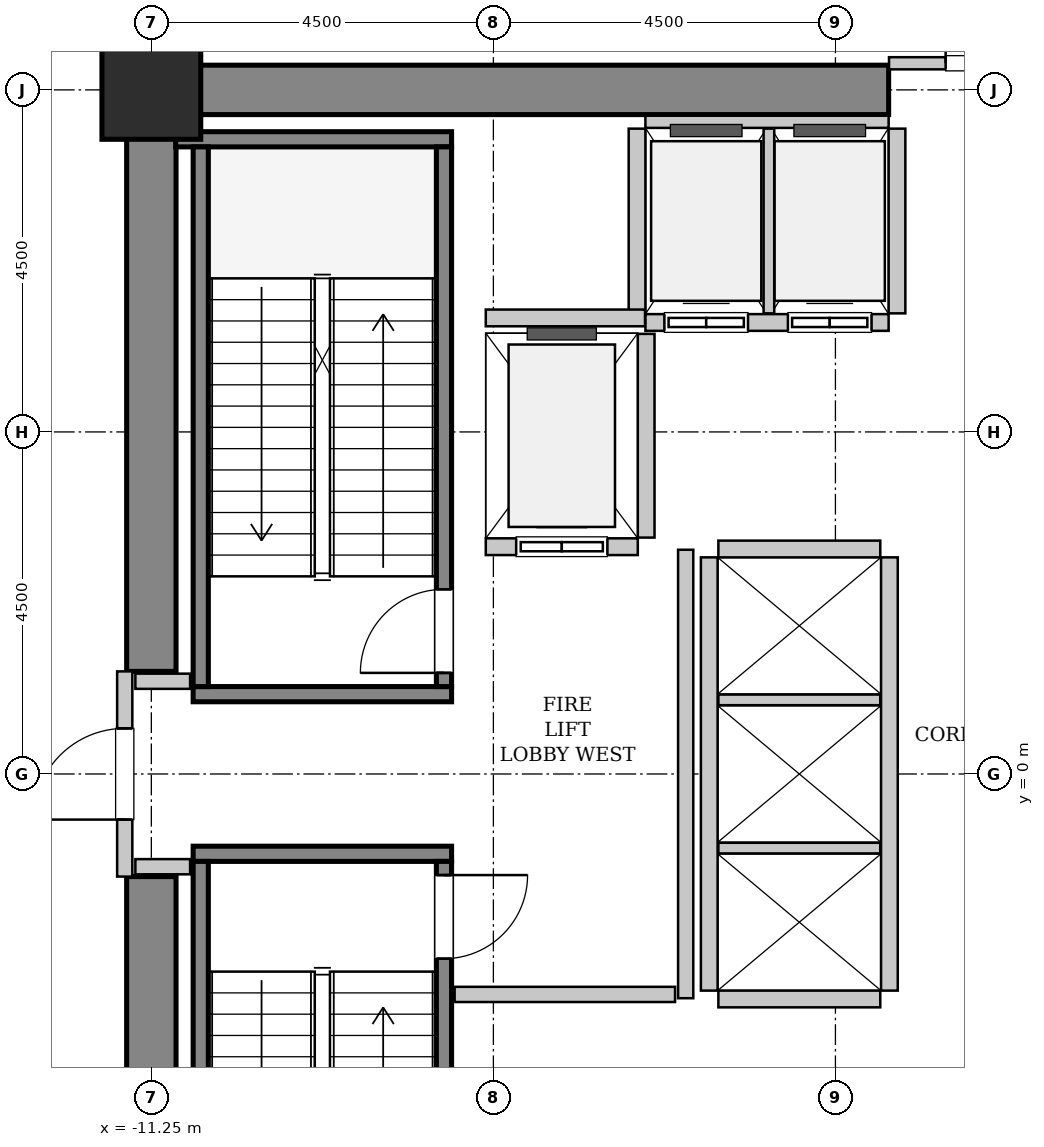
"""IFC4 building model, lengths in metres.
Left out: names, types, materials, properties, quantities, classifications, styles, units other than length and angle.
Written with IfcOpenShell. Run it as: python <this file> out.ifc"""

import sys

from ifc_helpers import new_model, si_unit, direction, frame, frame_2d, origin, origin_2d, place, context, subcontext, project, spatial, rectangle, hollow_rectangle, extrude, source, transform, mapped, element, fill, save


model = new_model("IFC4")
c1 = context("Model", 3, precision=1e-05, world=origin(), true_north=direction((0.0, 1.0)))
c2 = subcontext(c1, "Body", "Model", "MODEL_VIEW")
j1 = project(units=[si_unit("LENGTHUNIT", "METRE"), si_unit("PLANEANGLEUNIT", "RADIAN")], contexts=[c1])
p1 = place(None, origin())
s1 = spatial("IfcSite", under=j1, at=p1, CompositionType="ELEMENT")
p2 = place(p1, origin())
s2 = spatial("IfcBuilding", under=s1, at=p2, CompositionType="ELEMENT")
p3 = place(p2, frame((0.0, 0.0, 16.8)))
s3 = spatial("IfcBuildingStorey", under=s2, at=p3, CompositionType="ELEMENT", Elevation=16.8)
m1 = source(origin(), c2, "Body", "SweptSolid", [
    extrude(rectangle(XDim=10.025, YDim=0.65, at=frame_2d((5.012, 0.0))), origin(), (0.0, 0.0, 1.0), 5.4),
])
p4 = place(p3, frame((-11.575, 9.0, 0.0), z_axis=(0.0, 0.0, 1.0), x_axis=(1.0, 0.0, 0.0)))
e1 = element("IfcWall", 1, at=p4, inside=s3, PredefinedType="SHEAR", context=c2, shape_type="MappedRepresentation", body=[
    mapped(m1, transform((0.0, 0.0, 0.0), x_axis=(1.0, 0.0, 0.0), y_axis=(0.0, 1.0, 0.0), z_axis=(0.0, 0.0, 1.0), scale=1.0)),
])
m2 = source(origin(), c2, "Body", "SweptSolid", [
    extrude(rectangle(XDim=7.325, YDim=0.65, at=frame_2d((3.663, 0.0))), origin(), (0.0, 0.0, 1.0), 5.4),
])
for number, where, z_axis, x_axis in (
    (2, (-11.25, -8.675, 0.0), (0.0, 0.0, 1.0), (0.0, 1.0, 0.0)),
    (3, (-11.25, 1.35, 0.0), (0.0, 0.0, 1.0), (0.0, 1.0, 0.0)),
):
    element("IfcWall", number, at=place(p3, frame(where, z_axis=z_axis, x_axis=x_axis)), inside=s3, PredefinedType="SHEAR", context=c2, shape_type="MappedRepresentation", body=[
        mapped(m2, transform((0.0, 0.0, 0.0), x_axis=(1.0, 0.0, 0.0), y_axis=(0.0, 1.0, 0.0), z_axis=(0.0, 0.0, 1.0), scale=1.0)),
    ])
m3 = source(origin(), c2, "Body", "SweptSolid", [
    extrude(hollow_rectangle(XDim=1.3, YDim=1.3, WallThickness=0.065, InnerFilletRadius=0.065, OuterFilletRadius=0.13, at=origin_2d()), origin(), (0.0, 0.0, 1.0), 5.4),
])
p5 = place(p3, frame((-11.25, 9.0, 0.0), z_axis=(0.0, 0.0, 1.0), x_axis=(1.0, 0.0, 0.0)))
e4 = element("IfcColumn", 4, at=p5, inside=s3, PredefinedType="COLUMN", context=c2, shape_type="MappedRepresentation", body=[
    mapped(m3, transform((0.0, 0.0, 0.0), x_axis=(1.0, 0.0, 0.0), y_axis=(0.0, 1.0, 0.0), z_axis=(0.0, 0.0, 1.0), scale=1.0)),
])
m4 = source(origin(), c2, "Body", "SweptSolid", [
    extrude(rectangle(XDim=3.4, YDim=0.2, at=frame_2d((1.7, 0.0))), origin(), (0.0, 0.0, 1.0), 5.4),
])
p6 = place(p3, frame((-7.3, 1.05, 0.0), z_axis=(0.0, 0.0, 1.0), x_axis=(-1.0, 0.0, 0.0)))
e5 = element("IfcWall", 5, at=p6, inside=s3, PredefinedType="SOLIDWALL", context=c2, shape_type="MappedRepresentation", body=[
    mapped(m4, transform((0.0, 0.0, 0.0), x_axis=(1.0, 0.0, 0.0), y_axis=(0.0, 1.0, 0.0), z_axis=(0.0, 0.0, 1.0), scale=1.0)),
])
m5 = source(origin(), c2, "Body", "SweptSolid", [
    extrude(rectangle(XDim=3.63, YDim=0.2, at=frame_2d((1.815, 0.0))), origin(), (0.0, 0.0, 1.0), 5.4),
])
p7 = place(p3, frame((-7.3, 8.35, 0.0), z_axis=(0.0, 0.0, 1.0), x_axis=(-1.0, 0.0, 0.0)))
e6 = element("IfcWall", 6, at=p7, inside=s3, PredefinedType="SOLIDWALL", context=c2, shape_type="MappedRepresentation", body=[
    mapped(m5, transform((0.0, 0.0, 0.0), x_axis=(1.0, 0.0, 0.0), y_axis=(0.0, 1.0, 0.0), z_axis=(0.0, 0.0, 1.0), scale=1.0)),
])
m6 = source(origin(), c2, "Body", "SweptSolid", [
    extrude(rectangle(XDim=7.1, YDim=0.2, at=frame_2d((3.55, 0.0))), origin(), (0.0, 0.0, 1.0), 5.4),
])
p8 = place(p3, frame((-7.4, 1.15, 0.0), z_axis=(0.0, 0.0, 1.0), x_axis=(0.0, 1.0, 0.0)))
e7 = element("IfcWall", 7, at=p8, inside=s3, PredefinedType="SOLIDWALL", context=c2, shape_type="MappedRepresentation", body=[
    mapped(m6, transform((0.0, 0.0, 0.0), x_axis=(1.0, 0.0, 0.0), y_axis=(0.0, 1.0, 0.0), z_axis=(0.0, 0.0, 1.0), scale=1.0)),
])
p9 = place(p8, frame((0.18, 0.0, 0.0)))
e8 = element("IfcOpeningElement", 8, at=p9, cuts=e7, PredefinedType="OPENING", context=c2, shape_type="SweptSolid", body=[
    extrude(rectangle(XDim=1.1, YDim=2.15, at=frame_2d((0.55, 1.075))), frame((0.0, 0.11, 0.0), z_axis=(0.0, -1.0, 0.0), x_axis=(1.0, 0.0, 0.0)), (0.0, 0.0, 1.0), 0.22),
])
p10 = place(p3, frame((-10.6, 1.15, 0.0), z_axis=(0.0, 0.0, 1.0), x_axis=(0.0, 1.0, 0.0)))
e9 = element("IfcWall", 9, at=p10, inside=s3, PredefinedType="SOLIDWALL", context=c2, shape_type="MappedRepresentation", body=[
    mapped(m6, transform((0.0, 0.0, 0.0), x_axis=(1.0, 0.0, 0.0), y_axis=(0.0, 1.0, 0.0), z_axis=(0.0, 0.0, 1.0), scale=1.0)),
])
p11 = place(p3, frame((-10.7, -1.05, 0.0), z_axis=(0.0, 0.0, 1.0), x_axis=(1.0, 0.0, 0.0)))
e10 = element("IfcWall", 10, at=p11, inside=s3, PredefinedType="SOLIDWALL", context=c2, shape_type="MappedRepresentation", body=[
    mapped(m4, transform((0.0, 0.0, 0.0), x_axis=(1.0, 0.0, 0.0), y_axis=(0.0, 1.0, 0.0), z_axis=(0.0, 0.0, 1.0), scale=1.0)),
])
p12 = place(p3, frame((-10.6, -1.15, 0.0), z_axis=(0.0, 0.0, 1.0), x_axis=(0.0, -1.0, 0.0)))
e11 = element("IfcWall", 11, at=p12, inside=s3, PredefinedType="SOLIDWALL", context=c2, shape_type="MappedRepresentation", body=[
    mapped(m6, transform((0.0, 0.0, 0.0), x_axis=(1.0, 0.0, 0.0), y_axis=(0.0, 1.0, 0.0), z_axis=(0.0, 0.0, 1.0), scale=1.0)),
])
p13 = place(p3, frame((-7.4, -1.15, 0.0), z_axis=(0.0, 0.0, 1.0), x_axis=(0.0, -1.0, 0.0)))
e12 = element("IfcWall", 12, at=p13, inside=s3, PredefinedType="SOLIDWALL", context=c2, shape_type="MappedRepresentation", body=[
    mapped(m6, transform((0.0, 0.0, 0.0), x_axis=(1.0, 0.0, 0.0), y_axis=(0.0, 1.0, 0.0), z_axis=(0.0, 0.0, 1.0), scale=1.0)),
])
p14 = place(p13, frame((0.18, 0.0, 0.0)))
e13 = element("IfcOpeningElement", 13, at=p14, cuts=e12, PredefinedType="OPENING", context=c2, shape_type="SweptSolid", body=[
    extrude(rectangle(XDim=1.1, YDim=2.15, at=frame_2d((0.55, 1.075))), frame((0.0, 0.11, 0.0), z_axis=(0.0, -1.0, 0.0), x_axis=(1.0, 0.0, 0.0)), (0.0, 0.0, 1.0), 0.22),
])
m7 = source(origin(), c2, "Body", "SweptSolid", [
    extrude(rectangle(XDim=2.0, YDim=0.22, at=frame_2d((1.0, 0.0))), origin(), (0.0, 0.0, 1.0), 5.085),
])
p15 = place(p3, frame((-6.85, 2.99, 0.0), z_axis=(0.0, 0.0, 1.0), x_axis=(1.0, 0.0, 0.0)))
e14 = element("IfcWall", 14, at=p15, inside=s3, PredefinedType="SOLIDWALL", context=c2, shape_type="MappedRepresentation", body=[
    mapped(m7, transform((0.0, 0.0, 0.0), x_axis=(1.0, 0.0, 0.0), y_axis=(0.0, 1.0, 0.0), z_axis=(0.0, 0.0, 1.0), scale=1.0)),
])
p16 = place(p15, frame((0.4, 0.0, 0.0)))
e15 = element("IfcOpeningElement", 15, at=p16, cuts=e14, PredefinedType="OPENING", context=c2, shape_type="SweptSolid", body=[
    extrude(rectangle(XDim=1.2, YDim=2.2, at=frame_2d((0.6, 1.1))), frame((0.0, 0.12, 0.0), z_axis=(0.0, -1.0, 0.0), x_axis=(1.0, 0.0, 0.0)), (0.0, 0.0, 1.0), 0.24),
])
m8 = source(origin(), c2, "Body", "SweptSolid", [
    extrude(rectangle(XDim=2.68, YDim=0.22, at=frame_2d((1.34, 0.0))), origin(), (0.0, 0.0, 1.0), 5.085),
])
p17 = place(p3, frame((-4.74, 3.11, 0.0), z_axis=(0.0, 0.0, 1.0), x_axis=(0.0, 1.0, 0.0)))
e16 = element("IfcWall", 16, at=p17, inside=s3, PredefinedType="SOLIDWALL", context=c2, shape_type="MappedRepresentation", body=[
    mapped(m8, transform((0.0, 0.0, 0.0), x_axis=(1.0, 0.0, 0.0), y_axis=(0.0, 1.0, 0.0), z_axis=(0.0, 0.0, 1.0), scale=1.0)),
])
m9 = source(origin(), c2, "Body", "SweptSolid", [
    extrude(rectangle(XDim=3.2, YDim=0.22, at=frame_2d((1.6, 0.0))), origin(), (0.0, 0.0, 1.0), 5.085),
])
p18 = place(p3, frame((-4.75, 5.94, 0.0), z_axis=(0.0, 0.0, 1.0), x_axis=(1.0, 0.0, 0.0)))
e17 = element("IfcWall", 17, at=p18, inside=s3, PredefinedType="SOLIDWALL", context=c2, shape_type="MappedRepresentation", body=[
    mapped(m9, transform((0.0, 0.0, 0.0), x_axis=(1.0, 0.0, 0.0), y_axis=(0.0, 1.0, 0.0), z_axis=(0.0, 0.0, 1.0), scale=1.0)),
])
p19 = place(p18, frame((0.25, 0.0, 0.0)))
e18 = element("IfcOpeningElement", 18, at=p19, cuts=e17, PredefinedType="OPENING", context=c2, shape_type="SweptSolid", body=[
    extrude(rectangle(XDim=1.1, YDim=2.2, at=frame_2d((0.55, 1.1))), frame((0.0, 0.12, 0.0), z_axis=(0.0, -1.0, 0.0), x_axis=(1.0, 0.0, 0.0)), (0.0, 0.0, 1.0), 0.24),
])
p20 = place(p18, frame((1.875, 0.0, 0.0)))
e19 = element("IfcOpeningElement", 19, at=p20, cuts=e17, PredefinedType="OPENING", context=c2, shape_type="SweptSolid", body=[
    extrude(rectangle(XDim=1.1, YDim=2.2, at=frame_2d((0.55, 1.1))), frame((0.0, 0.12, 0.0), z_axis=(0.0, -1.0, 0.0), x_axis=(1.0, 0.0, 0.0)), (0.0, 0.0, 1.0), 0.24),
])
m10 = source(origin(), c2, "Body", "SweptSolid", [
    extrude(rectangle(XDim=3.2, YDim=0.16, at=frame_2d((1.6, 0.0))), origin(), (0.0, 0.0, 1.0), 3.975),
])
p21 = place(p3, frame((-1.55, 8.58, 0.0), z_axis=(0.0, 0.0, 1.0), x_axis=(-1.0, 0.0, 0.0)))
e20 = element("IfcWall", 20, at=p21, inside=s3, PredefinedType="PARTITIONING", context=c2, shape_type="MappedRepresentation", body=[
    mapped(m10, transform((0.0, 0.0, 0.0), x_axis=(1.0, 0.0, 0.0), y_axis=(0.0, 1.0, 0.0), z_axis=(0.0, 0.0, 1.0), scale=1.0)),
])
m11 = source(origin(), c2, "Body", "SweptSolid", [
    extrude(rectangle(XDim=2.43, YDim=0.22, at=frame_2d((1.215, 0.0))), origin(), (0.0, 0.0, 1.0), 5.085),
])
p22 = place(p3, frame((-4.86, 8.49, 0.0), z_axis=(0.0, 0.0, 1.0), x_axis=(0.0, -1.0, 0.0)))
e21 = element("IfcWall", 21, at=p22, inside=s3, PredefinedType="SOLIDWALL", context=c2, shape_type="MappedRepresentation", body=[
    mapped(m11, transform((0.0, 0.0, 0.0), x_axis=(1.0, 0.0, 0.0), y_axis=(0.0, 1.0, 0.0), z_axis=(0.0, 0.0, 1.0), scale=1.0)),
])
m12 = source(origin(), c2, "Body", "SweptSolid", [
    extrude(rectangle(XDim=2.43, YDim=0.14, at=frame_2d((1.215, 0.0))), origin(), (0.0, 0.0, 1.0), 5.085),
])
p23 = place(p3, frame((-3.125, 6.06, 0.0), z_axis=(0.0, 0.0, 1.0), x_axis=(0.0, 1.0, 0.0)))
e22 = element("IfcWall", 22, at=p23, inside=s3, PredefinedType="PARTITIONING", context=c2, shape_type="MappedRepresentation", body=[
    mapped(m12, transform((0.0, 0.0, 0.0), x_axis=(1.0, 0.0, 0.0), y_axis=(0.0, 1.0, 0.0), z_axis=(0.0, 0.0, 1.0), scale=1.0)),
])
p24 = place(p3, frame((-1.44, 6.06, 0.0), z_axis=(0.0, 0.0, 1.0), x_axis=(0.0, 1.0, 0.0)))
e23 = element("IfcWall", 23, at=p24, inside=s3, PredefinedType="SOLIDWALL", context=c2, shape_type="MappedRepresentation", body=[
    mapped(m11, transform((0.0, 0.0, 0.0), x_axis=(1.0, 0.0, 0.0), y_axis=(0.0, 1.0, 0.0), z_axis=(0.0, 0.0, 1.0), scale=1.0)),
])
m13 = source(origin(), c2, "Body", "SweptSolid", [
    extrude(rectangle(XDim=5.7, YDim=0.22, at=frame_2d((2.85, 0.0))), origin(), (0.0, 0.0, 1.0), 5.085),
])
for number, where, z_axis, x_axis in (
    (24, (-1.54, -2.85, 0.0), (0.0, 0.0, 1.0), (0.0, 1.0, 0.0)),
    (25, (-3.91, 2.85, 0.0), (0.0, 0.0, 1.0), (0.0, -1.0, 0.0)),
):
    element("IfcWall", number, at=place(p3, frame(where, z_axis=z_axis, x_axis=x_axis)), inside=s3, PredefinedType="SOLIDWALL", context=c2, shape_type="MappedRepresentation", body=[
        mapped(m13, transform((0.0, 0.0, 0.0), x_axis=(1.0, 0.0, 0.0), y_axis=(0.0, 1.0, 0.0), z_axis=(0.0, 0.0, 1.0), scale=1.0)),
    ])
m14 = source(origin(), c2, "Body", "SweptSolid", [
    extrude(rectangle(XDim=2.13, YDim=0.22, at=frame_2d((1.065, 0.0))), origin(), (0.0, 0.0, 1.0), 5.085),
])
p25 = place(p3, frame((-3.79, -2.96, 0.0), z_axis=(0.0, 0.0, 1.0), x_axis=(1.0, 0.0, 0.0)))
e26 = element("IfcWall", 26, at=p25, inside=s3, PredefinedType="SOLIDWALL", context=c2, shape_type="MappedRepresentation", body=[
    mapped(m14, transform((0.0, 0.0, 0.0), x_axis=(1.0, 0.0, 0.0), y_axis=(0.0, 1.0, 0.0), z_axis=(0.0, 0.0, 1.0), scale=1.0)),
])
m15 = source(origin(), c2, "Body", "SweptSolid", [
    extrude(rectangle(XDim=2.13, YDim=0.14, at=frame_2d((1.065, 0.0))), origin(), (0.0, 0.0, 1.0), 5.085),
])
for number, where, z_axis, x_axis in (
    (27, (-3.79, -0.975, 0.0), (0.0, 0.0, 1.0), (1.0, 0.0, 0.0)),
    (28, (-3.79, 0.975, 0.0), (0.0, 0.0, 1.0), (1.0, 0.0, 0.0)),
):
    element("IfcWall", number, at=place(p3, frame(where, z_axis=z_axis, x_axis=x_axis)), inside=s3, PredefinedType="PARTITIONING", context=c2, shape_type="MappedRepresentation", body=[
        mapped(m15, transform((0.0, 0.0, 0.0), x_axis=(1.0, 0.0, 0.0), y_axis=(0.0, 1.0, 0.0), z_axis=(0.0, 0.0, 1.0), scale=1.0)),
    ])
p26 = place(p3, frame((-1.66, 2.96, 0.0), z_axis=(0.0, 0.0, 1.0), x_axis=(-1.0, 0.0, 0.0)))
e29 = element("IfcWall", 29, at=p26, inside=s3, PredefinedType="SOLIDWALL", context=c2, shape_type="MappedRepresentation", body=[
    mapped(m14, transform((0.0, 0.0, 0.0), x_axis=(1.0, 0.0, 0.0), y_axis=(0.0, 1.0, 0.0), z_axis=(0.0, 0.0, 1.0), scale=1.0)),
])
m16 = source(origin(), c2, "Body", "SweptSolid", [
    extrude(rectangle(XDim=2.095, YDim=0.22, at=frame_2d((1.048, 0.0))), origin(), (0.0, 0.0, 1.0), 5.085),
])
p27 = place(p3, frame((-6.85, 6.0, 0.0), z_axis=(0.0, 0.0, 1.0), x_axis=(1.0, 0.0, 0.0)))
e30 = element("IfcWall", 30, at=p27, inside=s3, PredefinedType="SOLIDWALL", context=c2, shape_type="MappedRepresentation", body=[
    mapped(m16, transform((0.0, 0.0, 0.0), x_axis=(1.0, 0.0, 0.0), y_axis=(0.0, 1.0, 0.0), z_axis=(0.0, 0.0, 1.0), scale=1.0)),
])
m17 = source(origin(), c2, "Body", "SweptSolid", [
    extrude(rectangle(XDim=2.7, YDim=0.2, at=frame_2d((1.35, 0.0))), origin(), (0.0, 0.0, 1.0), 3.975),
])
p28 = place(p3, frame((-11.6, -1.35, 0.0), z_axis=(0.0, 0.0, 1.0), x_axis=(0.0, 1.0, 0.0)))
e31 = element("IfcWall", 31, at=p28, inside=s3, PredefinedType="PARTITIONING", context=c2, shape_type="MappedRepresentation", body=[
    mapped(m17, transform((0.0, 0.0, 0.0), x_axis=(1.0, 0.0, 0.0), y_axis=(0.0, 1.0, 0.0), z_axis=(0.0, 0.0, 1.0), scale=1.0)),
])
p29 = place(p28, frame((0.75, 0.0, 0.0)))
e32 = element("IfcOpeningElement", 32, at=p29, cuts=e31, PredefinedType="OPENING", context=c2, shape_type="SweptSolid", body=[
    extrude(rectangle(XDim=1.2, YDim=2.15, at=frame_2d((0.6, 1.075))), frame((0.0, 0.11, 0.0), z_axis=(0.0, -1.0, 0.0), x_axis=(1.0, 0.0, 0.0)), (0.0, 0.0, 1.0), 0.22),
])
m18 = source(origin(), c2, "Body", "SweptSolid", [
    extrude(rectangle(XDim=5.9, YDim=0.2, at=frame_2d((2.95, 0.0))), origin(), (0.0, 0.0, 1.0), 5.085),
])
p30 = place(p3, frame((-4.22, -2.95, 0.0), z_axis=(0.0, 0.0, 1.0), x_axis=(0.0, 1.0, 0.0)))
e33 = element("IfcWall", 33, at=p30, inside=s3, PredefinedType="PARTITIONING", context=c2, shape_type="MappedRepresentation", body=[
    mapped(m18, transform((0.0, 0.0, 0.0), x_axis=(1.0, 0.0, 0.0), y_axis=(0.0, 1.0, 0.0), z_axis=(0.0, 0.0, 1.0), scale=1.0)),
])
m19 = source(origin(), c2, "Body", "SweptSolid", [
    extrude(rectangle(XDim=2.9, YDim=0.2, at=frame_2d((1.45, 0.0))), origin(), (0.0, 0.0, 1.0), 5.085),
])
p31 = place(p3, frame((-7.26, -2.9, 0.0), z_axis=(0.0, 0.0, 1.0), x_axis=(1.0, 0.0, 0.0)))
e34 = element("IfcWall", 34, at=p31, inside=s3, PredefinedType="PARTITIONING", context=c2, shape_type="MappedRepresentation", body=[
    mapped(m19, transform((0.0, 0.0, 0.0), x_axis=(1.0, 0.0, 0.0), y_axis=(0.0, 1.0, 0.0), z_axis=(0.0, 0.0, 1.0), scale=1.0)),
])
m20 = source(origin(), c2, "Body", "SweptSolid", [
    extrude(rectangle(XDim=0.72, YDim=0.2, at=frame_2d((0.36, 0.0))), origin(), (0.0, 0.0, 1.0), 5.085),
])
for number, where, z_axis, x_axis in (
    (35, (-11.46, 1.22, 0.0), (0.0, 0.0, 1.0), (1.0, 0.0, 0.0)),
    (36, (-11.46, -1.22, 0.0), (0.0, 0.0, 1.0), (1.0, 0.0, 0.0)),
):
    element("IfcWall", number, at=place(p3, frame(where, z_axis=z_axis, x_axis=x_axis)), inside=s3, PredefinedType="PARTITIONING", context=c2, shape_type="MappedRepresentation", body=[
        mapped(m20, transform((0.0, 0.0, 0.0), x_axis=(1.0, 0.0, 0.0), y_axis=(0.0, 1.0, 0.0), z_axis=(0.0, 0.0, 1.0), scale=1.0)),
    ])
m21 = source(origin(), c2, "Body", "SweptSolid", [
    extrude(rectangle(XDim=3.09, YDim=0.16, at=frame_2d((1.545, 0.0))), origin(), (0.0, 0.0, 1.0), 3.975),
])
p32 = place(p3, frame((-1.545, 9.35, 0.0), z_axis=(0.0, 0.0, 1.0), x_axis=(1.0, 0.0, 0.0)))
e37 = element("IfcWall", 37, at=p32, inside=s3, PredefinedType="PARTITIONING", context=c2, shape_type="MappedRepresentation", body=[
    mapped(m21, transform((0.0, 0.0, 0.0), x_axis=(1.0, 0.0, 0.0), y_axis=(0.0, 1.0, 0.0), z_axis=(0.0, 0.0, 1.0), scale=1.0)),
])
p33 = place(p32, frame((0.745, 0.0, 0.0)))
e38 = element("IfcOpeningElement", 38, at=p33, cuts=e37, PredefinedType="OPENING", context=c2, shape_type="SweptSolid", body=[
    extrude(rectangle(XDim=1.6, YDim=2.3, at=frame_2d((0.8, 1.15))), frame((0.0, 0.09, 0.0), z_axis=(0.0, -1.0, 0.0), x_axis=(1.0, 0.0, 0.0)), (0.0, 0.0, 1.0), 0.18),
])
m22 = source(origin(), c2, "Body", "SweptSolid", [
    extrude(rectangle(XDim=1.1, YDim=2.15, at=frame_2d((0.55, 1.075))), frame((0.0, 0.025, 0.0), z_axis=(0.0, -1.0, 0.0), x_axis=(1.0, 0.0, 0.0)), (0.0, 0.0, 1.0), 0.05),
])
p34 = place(p9, origin())
e39 = element("IfcDoor", 39, at=p34, inside=s3, OperationType="SINGLE_SWING_LEFT", PredefinedType="DOOR", context=c2, shape_type="MappedRepresentation", body=[
    mapped(m22, transform((0.0, 0.0, 0.0), x_axis=(1.0, 0.0, 0.0), y_axis=(0.0, 1.0, 0.0), z_axis=(0.0, 0.0, 1.0), scale=1.0)),
])
fill(e8, e39)
p35 = place(p14, origin())
e40 = element("IfcDoor", 40, at=p35, inside=s3, OperationType="SINGLE_SWING_LEFT", PredefinedType="DOOR", context=c2, shape_type="MappedRepresentation", body=[
    mapped(m22, transform((0.0, 0.0, 0.0), x_axis=(1.0, 0.0, 0.0), y_axis=(0.0, 1.0, 0.0), z_axis=(0.0, 0.0, 1.0), scale=1.0)),
])
fill(e13, e40)
m23 = source(origin(), c2, "Body", "SweptSolid", [
    extrude(rectangle(XDim=1.2, YDim=2.2, at=frame_2d((0.6, 1.1))), frame((0.0, 0.025, 0.0), z_axis=(0.0, -1.0, 0.0), x_axis=(1.0, 0.0, 0.0)), (0.0, 0.0, 1.0), 0.05),
])
p36 = place(p16, origin())
e41 = element("IfcDoor", 41, at=p36, inside=s3, OperationType="SLIDING_TO_LEFT", PredefinedType="DOOR", context=c2, shape_type="MappedRepresentation", body=[
    mapped(m23, transform((0.0, 0.0, 0.0), x_axis=(1.0, 0.0, 0.0), y_axis=(0.0, 1.0, 0.0), z_axis=(0.0, 0.0, 1.0), scale=1.0)),
])
fill(e15, e41)
m24 = source(origin(), c2, "Body", "SweptSolid", [
    extrude(rectangle(XDim=1.1, YDim=2.2, at=frame_2d((0.55, 1.1))), frame((0.0, 0.025, 0.0), z_axis=(0.0, -1.0, 0.0), x_axis=(1.0, 0.0, 0.0)), (0.0, 0.0, 1.0), 0.05),
])
p37 = place(p19, origin())
e42 = element("IfcDoor", 42, at=p37, inside=s3, OperationType="DOUBLE_DOOR_SLIDING", PredefinedType="DOOR", context=c2, shape_type="MappedRepresentation", body=[
    mapped(m24, transform((0.0, 0.0, 0.0), x_axis=(1.0, 0.0, 0.0), y_axis=(0.0, 1.0, 0.0), z_axis=(0.0, 0.0, 1.0), scale=1.0)),
])
fill(e18, e42)
p38 = place(p20, origin())
e43 = element("IfcDoor", 43, at=p38, inside=s3, OperationType="DOUBLE_DOOR_SLIDING", PredefinedType="DOOR", context=c2, shape_type="MappedRepresentation", body=[
    mapped(m24, transform((0.0, 0.0, 0.0), x_axis=(1.0, 0.0, 0.0), y_axis=(0.0, 1.0, 0.0), z_axis=(0.0, 0.0, 1.0), scale=1.0)),
])
fill(e19, e43)
m25 = source(origin(), c2, "Body", "SweptSolid", [
    extrude(rectangle(XDim=1.2, YDim=2.15, at=frame_2d((0.6, 1.075))), frame((0.0, 0.025, 0.0), z_axis=(0.0, -1.0, 0.0), x_axis=(1.0, 0.0, 0.0)), (0.0, 0.0, 1.0), 0.05),
])
p39 = place(p29, origin())
e44 = element("IfcDoor", 44, at=p39, inside=s3, OperationType="SINGLE_SWING_LEFT", PredefinedType="DOOR", context=c2, shape_type="MappedRepresentation", body=[
    mapped(m25, transform((0.0, 0.0, 0.0), x_axis=(1.0, 0.0, 0.0), y_axis=(0.0, 1.0, 0.0), z_axis=(0.0, 0.0, 1.0), scale=1.0)),
])
fill(e32, e44)
m26 = source(origin(), c2, "Body", "SweptSolid", [
    extrude(rectangle(XDim=1.6, YDim=2.3, at=frame_2d((0.8, 1.15))), frame((0.0, 0.025, 0.0), z_axis=(0.0, -1.0, 0.0), x_axis=(1.0, 0.0, 0.0)), (0.0, 0.0, 1.0), 0.05),
])
p40 = place(p33, origin())
e45 = element("IfcDoor", 45, at=p40, inside=s3, OperationType="DOUBLE_DOOR_SINGLE_SWING", PredefinedType="DOOR", context=c2, shape_type="MappedRepresentation", body=[
    mapped(m26, transform((0.0, 0.0, 0.0), x_axis=(1.0, 0.0, 0.0), y_axis=(0.0, 1.0, 0.0), z_axis=(0.0, 0.0, 1.0), scale=1.0)),
])
fill(e38, e45)
save(model, sys.argv[1])
